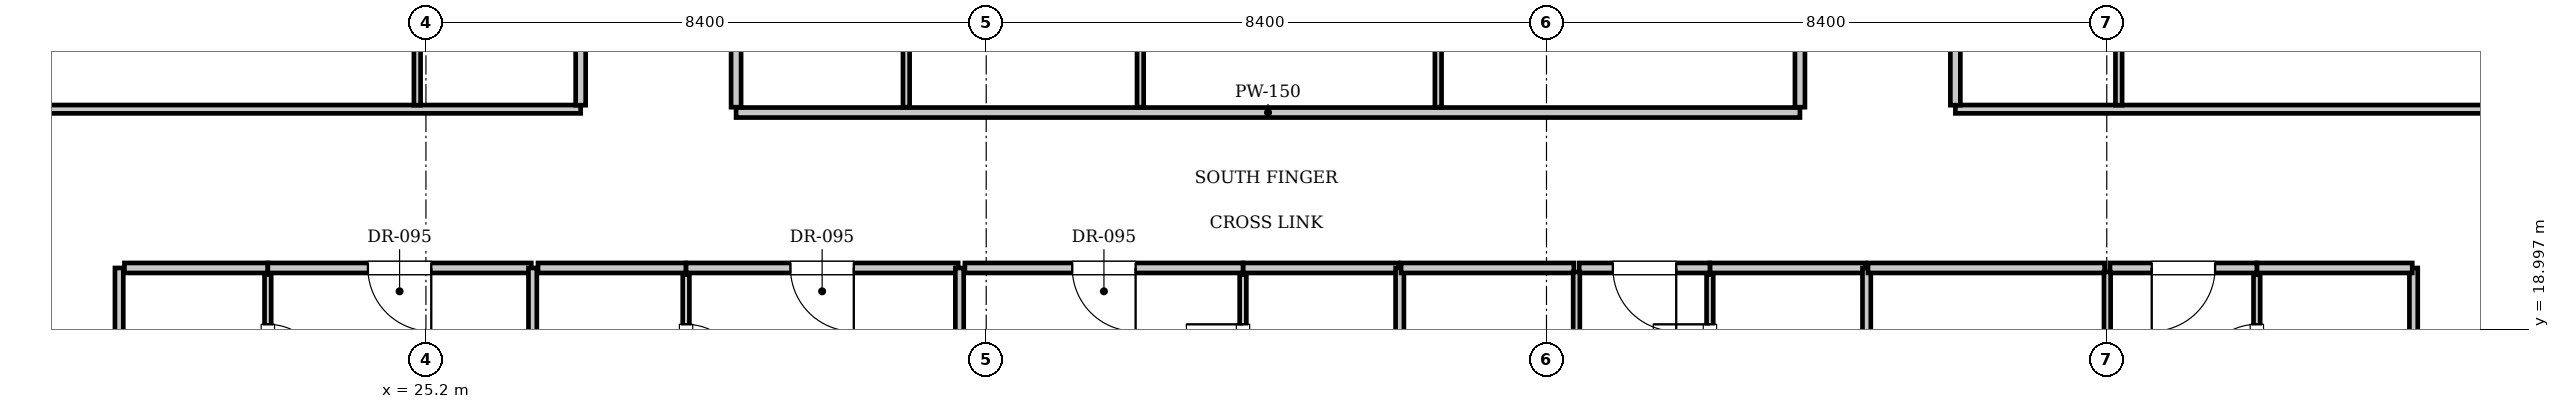
"""IFC4 building model, lengths in metres.
Left out: names, types, materials, properties, quantities, classifications, styles, units other than length and angle.
Written with IfcOpenShell. Run it as: python <this file> out.ifc"""

import sys

from ifc_helpers import new_model, si_unit, direction, frame, frame_2d, origin, place, context, subcontext, project, spatial, rectangle, extrude, element, fill, save


model = new_model("IFC4")
c1 = context("Model", 3, precision=1e-05, world=origin(), true_north=direction((0.0, 1.0)))
c2 = subcontext(c1, "Body", "Model", "MODEL_VIEW")
j1 = project(units=[si_unit("LENGTHUNIT", "METRE"), si_unit("PLANEANGLEUNIT", "RADIAN")], contexts=[c1])
p1 = place(None, origin())
s1 = spatial("IfcSite", under=j1, at=p1, CompositionType="ELEMENT")
p2 = place(p1, origin())
s2 = spatial("IfcBuilding", under=s1, at=p2, CompositionType="ELEMENT")
p3 = place(p2, frame((0.0, 0.0, 285.6)))
s3 = spatial("IfcBuildingStorey", under=s2, at=p3, CompositionType="ELEMENT", Elevation=285.6)
p4 = place(p3, frame((29.85, 22.25, 0.0), z_axis=(0.0, 0.0, 1.0), x_axis=(1.0, 0.0, 0.0)))
e1 = element("IfcWall", 1, at=p4, inside=s3, PredefinedType="PARTITIONING", context=c2, shape_type="SweptSolid", body=[
    extrude(rectangle(XDim=15.95, YDim=0.15, at=frame_2d((7.975, 0.0))), origin(), (0.0, 0.0, 1.0), 3.61),
])
for number, where, z_axis, x_axis in (
    (2, (29.85, 22.33, 0.0), (0.0, 0.0, 1.0), (0.0, 1.0, 0.0)),
    (3, (45.8, 22.33, 0.0), (0.0, 0.0, 1.0), (0.0, 1.0, 0.0)),
):
    element("IfcWall", number, at=place(p3, frame(where, z_axis=z_axis, x_axis=x_axis)), inside=s3, PredefinedType="PARTITIONING", context=c2, shape_type="SweptSolid", body=[
        extrude(rectangle(XDim=7.69, YDim=0.15, at=frame_2d((3.845, 0.0))), origin(), (0.0, 0.0, 1.0), 3.61),
    ])
for number, where, z_axis, x_axis in (
    (4, (32.402, 22.33, 0.0), (0.0, 0.0, 1.0), (0.0, 1.0, 0.0)),
    (5, (35.911, 22.33, 0.0), (0.0, 0.0, 1.0), (0.0, 1.0, 0.0)),
    (6, (40.377, 22.33, 0.0), (0.0, 0.0, 1.0), (0.0, 1.0, 0.0)),
):
    element("IfcWall", number, at=place(p3, frame(where, z_axis=z_axis, x_axis=x_axis)), inside=s3, PredefinedType="PARTITIONING", context=c2, shape_type="SweptSolid", body=[
        extrude(rectangle(XDim=7.69, YDim=0.1, at=frame_2d((3.845, 0.0))), origin(), (0.0, 0.0, 1.0), 3.61),
    ])
for number, where, z_axis, x_axis in (
    (7, (20.6, 14.4, 0.0), (0.0, 0.0, 1.0), (0.0, 1.0, 0.0)),
    (8, (55.0, 14.4, 0.0), (0.0, 0.0, 1.0), (0.0, 1.0, 0.0)),
):
    element("IfcWall", number, at=place(p3, frame(where, z_axis=z_axis, x_axis=x_axis)), inside=s3, PredefinedType="PARTITIONING", context=c2, shape_type="SweptSolid", body=[
        extrude(rectangle(XDim=5.52, YDim=0.125, at=frame_2d((2.76, 0.0))), origin(), (0.0, 0.0, 1.0), 3.61),
    ])
p5 = place(p3, frame((20.68, 19.92, 0.0), z_axis=(0.0, 0.0, 1.0), x_axis=(1.0, 0.0, 0.0)))
e9 = element("IfcWall", 9, at=p5, inside=s3, PredefinedType="PARTITIONING", context=c2, shape_type="SweptSolid", body=[
    extrude(rectangle(XDim=2.15, YDim=0.15, at=frame_2d((1.075, 0.0))), origin(), (0.0, 0.0, 1.0), 3.61),
])
p6 = place(p3, frame((22.83, 17.48, 0.0), z_axis=(0.0, 0.0, 1.0), x_axis=(0.0, 1.0, 0.0)))
e10 = element("IfcWall", 10, at=p6, inside=s3, PredefinedType="PARTITIONING", context=c2, shape_type="SweptSolid", body=[
    extrude(rectangle(XDim=2.34, YDim=0.1, at=frame_2d((1.17, 0.0))), origin(), (0.0, 0.0, 1.0), 3.61),
])
p7 = place(p6, frame((0.745, 0.0, 0.0)))
e11 = element("IfcOpeningElement", 11, at=p7, cuts=e10, PredefinedType="OPENING", context=c2, shape_type="SweptSolid", body=[
    extrude(rectangle(XDim=0.85, YDim=2.1, at=frame_2d((0.425, 1.05))), frame((0.0, 0.06, 0.0), z_axis=(0.0, -1.0, 0.0), x_axis=(1.0, 0.0, 0.0)), (0.0, 0.0, 1.0), 0.12),
])
p8 = place(p3, frame((22.83, 19.92, 0.0), z_axis=(0.0, 0.0, 1.0), x_axis=(1.0, 0.0, 0.0)))
e12 = element("IfcWall", 12, at=p8, inside=s3, PredefinedType="PARTITIONING", context=c2, shape_type="SweptSolid", body=[
    extrude(rectangle(XDim=3.95, YDim=0.15, at=frame_2d((1.975, 0.0))), origin(), (0.0, 0.0, 1.0), 3.61),
])
p9 = place(p8, frame((1.5, 0.0, 0.0)))
e13 = element("IfcOpeningElement", 13, at=p9, cuts=e12, PredefinedType="OPENING", context=c2, shape_type="SweptSolid", body=[
    extrude(rectangle(XDim=0.95, YDim=2.15, at=frame_2d((0.475, 1.075))), frame((0.0, 0.085, 0.0), z_axis=(0.0, -1.0, 0.0), x_axis=(1.0, 0.0, 0.0)), (0.0, 0.0, 1.0), 0.17),
])
p10 = place(p3, frame((26.8, 9.3, 0.0), z_axis=(0.0, 0.0, 1.0), x_axis=(0.0, 1.0, 0.0)))
e14 = element("IfcWall", 14, at=p10, inside=s3, PredefinedType="PARTITIONING", context=c2, shape_type="SweptSolid", body=[
    extrude(rectangle(XDim=10.62, YDim=0.125, at=frame_2d((5.31, 0.0))), origin(), (0.0, 0.0, 1.0), 3.61),
])
p11 = place(p3, frame((26.88, 19.92, 0.0), z_axis=(0.0, 0.0, 1.0), x_axis=(1.0, 0.0, 0.0)))
e15 = element("IfcWall", 15, at=p11, inside=s3, PredefinedType="PARTITIONING", context=c2, shape_type="SweptSolid", body=[
    extrude(rectangle(XDim=2.22, YDim=0.15, at=frame_2d((1.11, 0.0))), origin(), (0.0, 0.0, 1.0), 3.61),
])
p12 = place(p3, frame((29.1, 17.48, 0.0), z_axis=(0.0, 0.0, 1.0), x_axis=(0.0, 1.0, 0.0)))
e16 = element("IfcWall", 16, at=p12, inside=s3, PredefinedType="PARTITIONING", context=c2, shape_type="SweptSolid", body=[
    extrude(rectangle(XDim=2.34, YDim=0.1, at=frame_2d((1.17, 0.0))), origin(), (0.0, 0.0, 1.0), 3.61),
])
p13 = place(p12, frame((0.745, 0.0, 0.0)))
e17 = element("IfcOpeningElement", 17, at=p13, cuts=e16, PredefinedType="OPENING", context=c2, shape_type="SweptSolid", body=[
    extrude(rectangle(XDim=0.85, YDim=2.1, at=frame_2d((0.425, 1.05))), frame((0.0, 0.06, 0.0), z_axis=(0.0, -1.0, 0.0), x_axis=(1.0, 0.0, 0.0)), (0.0, 0.0, 1.0), 0.12),
])
p14 = place(p3, frame((29.1, 19.92, 0.0), z_axis=(0.0, 0.0, 1.0), x_axis=(1.0, 0.0, 0.0)))
e18 = element("IfcWall", 18, at=p14, inside=s3, PredefinedType="PARTITIONING", context=c2, shape_type="SweptSolid", body=[
    extrude(rectangle(XDim=4.08, YDim=0.15, at=frame_2d((2.04, 0.0))), origin(), (0.0, 0.0, 1.0), 3.61),
])
p15 = place(p14, frame((1.565, 0.0, 0.0)))
e19 = element("IfcOpeningElement", 19, at=p15, cuts=e18, PredefinedType="OPENING", context=c2, shape_type="SweptSolid", body=[
    extrude(rectangle(XDim=0.95, YDim=2.15, at=frame_2d((0.475, 1.075))), frame((0.0, 0.085, 0.0), z_axis=(0.0, -1.0, 0.0), x_axis=(1.0, 0.0, 0.0)), (0.0, 0.0, 1.0), 0.17),
])
p16 = place(p3, frame((33.2, 9.3, 0.0), z_axis=(0.0, 0.0, 1.0), x_axis=(0.0, 1.0, 0.0)))
e20 = element("IfcWall", 20, at=p16, inside=s3, PredefinedType="PARTITIONING", context=c2, shape_type="SweptSolid", body=[
    extrude(rectangle(XDim=10.62, YDim=0.125, at=frame_2d((5.31, 0.0))), origin(), (0.0, 0.0, 1.0), 3.61),
])
p17 = place(p3, frame((37.45, 19.92, 0.0), z_axis=(0.0, 0.0, 1.0), x_axis=(1.0, 0.0, 0.0)))
e21 = element("IfcWall", 21, at=p17, inside=s3, PredefinedType="PARTITIONING", context=c2, shape_type="SweptSolid", body=[
    extrude(rectangle(XDim=2.33, YDim=0.15, at=frame_2d((1.165, 0.0))), origin(), (0.0, 0.0, 1.0), 3.61),
])
p18 = place(p3, frame((37.45, 17.48, 0.0), z_axis=(0.0, 0.0, 1.0), x_axis=(0.0, 1.0, 0.0)))
e22 = element("IfcWall", 22, at=p18, inside=s3, PredefinedType="PARTITIONING", context=c2, shape_type="SweptSolid", body=[
    extrude(rectangle(XDim=2.34, YDim=0.1, at=frame_2d((1.17, 0.0))), origin(), (0.0, 0.0, 1.0), 3.61),
])
p19 = place(p18, frame((0.745, 0.0, 0.0)))
e23 = element("IfcOpeningElement", 23, at=p19, cuts=e22, PredefinedType="OPENING", context=c2, shape_type="SweptSolid", body=[
    extrude(rectangle(XDim=0.85, YDim=2.1, at=frame_2d((0.425, 1.05))), frame((0.0, 0.06, 0.0), z_axis=(0.0, -1.0, 0.0), x_axis=(1.0, 0.0, 0.0)), (0.0, 0.0, 1.0), 0.12),
])
p20 = place(p3, frame((33.28, 19.92, 0.0), z_axis=(0.0, 0.0, 1.0), x_axis=(1.0, 0.0, 0.0)))
e24 = element("IfcWall", 24, at=p20, inside=s3, PredefinedType="PARTITIONING", context=c2, shape_type="SweptSolid", body=[
    extrude(rectangle(XDim=4.17, YDim=0.15, at=frame_2d((2.085, 0.0))), origin(), (0.0, 0.0, 1.0), 3.61),
])
p21 = place(p20, frame((1.61, 0.0, 0.0)))
e25 = element("IfcOpeningElement", 25, at=p21, cuts=e24, PredefinedType="OPENING", context=c2, shape_type="SweptSolid", body=[
    extrude(rectangle(XDim=0.95, YDim=2.15, at=frame_2d((0.475, 1.075))), frame((0.0, 0.085, 0.0), z_axis=(0.0, -1.0, 0.0), x_axis=(1.0, 0.0, 0.0)), (0.0, 0.0, 1.0), 0.17),
])
p22 = place(p3, frame((39.8, 9.3, 0.0), z_axis=(0.0, 0.0, 1.0), x_axis=(0.0, 1.0, 0.0)))
e26 = element("IfcWall", 26, at=p22, inside=s3, PredefinedType="PARTITIONING", context=c2, shape_type="SweptSolid", body=[
    extrude(rectangle(XDim=10.62, YDim=0.125, at=frame_2d((5.31, 0.0))), origin(), (0.0, 0.0, 1.0), 3.61),
])
p23 = place(p3, frame((44.45, 19.92, 0.0), z_axis=(0.0, 0.0, 1.0), x_axis=(1.0, 0.0, 0.0)))
e27 = element("IfcWall", 27, at=p23, inside=s3, PredefinedType="PARTITIONING", context=c2, shape_type="SweptSolid", body=[
    extrude(rectangle(XDim=2.33, YDim=0.15, at=frame_2d((1.165, 0.0))), origin(), (0.0, 0.0, 1.0), 3.61),
])
p24 = place(p3, frame((44.45, 17.48, 0.0), z_axis=(0.0, 0.0, 1.0), x_axis=(0.0, 1.0, 0.0)))
e28 = element("IfcWall", 28, at=p24, inside=s3, PredefinedType="PARTITIONING", context=c2, shape_type="SweptSolid", body=[
    extrude(rectangle(XDim=2.34, YDim=0.1, at=frame_2d((1.17, 0.0))), origin(), (0.0, 0.0, 1.0), 3.61),
])
p25 = place(p24, frame((0.745, 0.0, 0.0)))
e29 = element("IfcOpeningElement", 29, at=p25, cuts=e28, PredefinedType="OPENING", context=c2, shape_type="SweptSolid", body=[
    extrude(rectangle(XDim=0.85, YDim=2.1, at=frame_2d((0.425, 1.05))), frame((0.0, 0.06, 0.0), z_axis=(0.0, -1.0, 0.0), x_axis=(1.0, 0.0, 0.0)), (0.0, 0.0, 1.0), 0.12),
])
p26 = place(p3, frame((39.82, 19.92, 0.0), z_axis=(0.0, 0.0, 1.0), x_axis=(1.0, 0.0, 0.0)))
e30 = element("IfcWall", 30, at=p26, inside=s3, PredefinedType="PARTITIONING", context=c2, shape_type="SweptSolid", body=[
    extrude(rectangle(XDim=2.59, YDim=0.15, at=frame_2d((1.295, 0.0))), origin(), (0.0, 0.0, 1.0), 3.61),
])
p27 = place(p3, frame((42.49, 19.92, 0.0), z_axis=(0.0, 0.0, 1.0), x_axis=(1.0, 0.0, 0.0)))
e31 = element("IfcWall", 31, at=p27, inside=s3, PredefinedType="PARTITIONING", context=c2, shape_type="SweptSolid", body=[
    extrude(rectangle(XDim=1.96, YDim=0.15, at=frame_2d((0.98, 0.0))), origin(), (0.0, 0.0, 1.0), 3.61),
])
p28 = place(p27, frame((0.505, 0.0, 0.0)))
e32 = element("IfcOpeningElement", 32, at=p28, cuts=e31, PredefinedType="OPENING", context=c2, shape_type="SweptSolid", body=[
    extrude(rectangle(XDim=0.95, YDim=2.15, at=frame_2d((0.475, 1.075))), frame((0.0, 0.085, 0.0), z_axis=(0.0, -1.0, 0.0), x_axis=(1.0, 0.0, 0.0)), (0.0, 0.0, 1.0), 0.17),
])
p29 = place(p3, frame((42.45, 9.23, 0.0), z_axis=(0.0, 0.0, 1.0), x_axis=(0.0, 1.0, 0.0)))
e33 = element("IfcWall", 33, at=p29, inside=s3, PredefinedType="PARTITIONING", context=c2, shape_type="SweptSolid", body=[
    extrude(rectangle(XDim=10.63, YDim=0.1, at=frame_2d((5.315, 0.0))), origin(), (0.0, 0.0, 1.0), 3.61),
])
p30 = place(p29, frame((1.6, 0.0, 0.0)))
e34 = element("IfcOpeningElement", 34, at=p30, cuts=e33, PredefinedType="OPENING", context=c2, shape_type="SweptSolid", body=[
    extrude(rectangle(XDim=0.9, YDim=2.1, at=frame_2d((0.45, 1.05))), frame((0.0, 0.06, 0.0), z_axis=(0.0, -1.0, 0.0), x_axis=(1.0, 0.0, 0.0)), (0.0, 0.0, 1.0), 0.12),
])
p31 = place(p3, frame((46.8, 9.3, 0.0), z_axis=(0.0, 0.0, 1.0), x_axis=(0.0, 1.0, 0.0)))
e35 = element("IfcWall", 35, at=p31, inside=s3, PredefinedType="PARTITIONING", context=c2, shape_type="SweptSolid", body=[
    extrude(rectangle(XDim=10.62, YDim=0.125, at=frame_2d((5.31, 0.0))), origin(), (0.0, 0.0, 1.0), 3.61),
])
p32 = place(p3, frame((52.65, 19.92, 0.0), z_axis=(0.0, 0.0, 1.0), x_axis=(1.0, 0.0, 0.0)))
e36 = element("IfcWall", 36, at=p32, inside=s3, PredefinedType="PARTITIONING", context=c2, shape_type="SweptSolid", body=[
    extrude(rectangle(XDim=2.33, YDim=0.15, at=frame_2d((1.165, 0.0))), origin(), (0.0, 0.0, 1.0), 3.61),
])
p33 = place(p3, frame((52.65, 17.48, 0.0), z_axis=(0.0, 0.0, 1.0), x_axis=(0.0, 1.0, 0.0)))
e37 = element("IfcWall", 37, at=p33, inside=s3, PredefinedType="PARTITIONING", context=c2, shape_type="SweptSolid", body=[
    extrude(rectangle(XDim=2.34, YDim=0.1, at=frame_2d((1.17, 0.0))), origin(), (0.0, 0.0, 1.0), 3.61),
])
p34 = place(p33, frame((0.745, 0.0, 0.0)))
e38 = element("IfcOpeningElement", 38, at=p34, cuts=e37, PredefinedType="OPENING", context=c2, shape_type="SweptSolid", body=[
    extrude(rectangle(XDim=0.85, YDim=2.1, at=frame_2d((0.425, 1.05))), frame((0.0, 0.06, 0.0), z_axis=(0.0, -1.0, 0.0), x_axis=(1.0, 0.0, 0.0)), (0.0, 0.0, 1.0), 0.12),
])
p35 = place(p3, frame((46.82, 19.92, 0.0), z_axis=(0.0, 0.0, 1.0), x_axis=(1.0, 0.0, 0.0)))
e39 = element("IfcWall", 39, at=p35, inside=s3, PredefinedType="PARTITIONING", context=c2, shape_type="SweptSolid", body=[
    extrude(rectangle(XDim=3.548, YDim=0.15, at=frame_2d((1.774, 0.0))), origin(), (0.0, 0.0, 1.0), 3.61),
])
p36 = place(p3, frame((50.448, 19.92, 0.0), z_axis=(0.0, 0.0, 1.0), x_axis=(1.0, 0.0, 0.0)))
e40 = element("IfcWall", 40, at=p36, inside=s3, PredefinedType="PARTITIONING", context=c2, shape_type="SweptSolid", body=[
    extrude(rectangle(XDim=2.202, YDim=0.15, at=frame_2d((1.101, 0.0))), origin(), (0.0, 0.0, 1.0), 3.61),
])
p37 = place(p36, frame((0.626, 0.0, 0.0)))
e41 = element("IfcOpeningElement", 41, at=p37, cuts=e40, PredefinedType="OPENING", context=c2, shape_type="SweptSolid", body=[
    extrude(rectangle(XDim=0.95, YDim=2.15, at=frame_2d((0.475, 1.075))), frame((0.0, 0.085, 0.0), z_axis=(0.0, -1.0, 0.0), x_axis=(1.0, 0.0, 0.0)), (0.0, 0.0, 1.0), 0.17),
])
p38 = place(p3, frame((50.408, 9.23, 0.0), z_axis=(0.0, 0.0, 1.0), x_axis=(0.0, 1.0, 0.0)))
e42 = element("IfcWall", 42, at=p38, inside=s3, PredefinedType="PARTITIONING", context=c2, shape_type="SweptSolid", body=[
    extrude(rectangle(XDim=10.63, YDim=0.1, at=frame_2d((5.315, 0.0))), origin(), (0.0, 0.0, 1.0), 3.081),
])
p39 = place(p38, frame((1.6, 0.0, 0.0)))
e43 = element("IfcOpeningElement", 43, at=p39, cuts=e42, PredefinedType="OPENING", context=c2, shape_type="SweptSolid", body=[
    extrude(rectangle(XDim=0.9, YDim=2.1, at=frame_2d((0.45, 1.05))), frame((0.0, 0.06, 0.0), z_axis=(0.0, -1.0, 0.0), x_axis=(1.0, 0.0, 0.0)), (0.0, 0.0, 1.0), 0.12),
])
p40 = place(p3, frame((15.5, 22.3, 0.0), z_axis=(0.0, 0.0, 1.0), x_axis=(1.0, 0.0, 0.0)))
e44 = element("IfcWall", 44, at=p40, inside=s3, PredefinedType="PARTITIONING", context=c2, shape_type="SweptSolid", body=[
    extrude(rectangle(XDim=12.02, YDim=0.125, at=frame_2d((6.01, 0.0))), origin(), (0.0, 0.0, 1.0), 3.61),
])
p41 = place(p3, frame((48.13, 22.3, 0.0), z_axis=(0.0, 0.0, 1.0), x_axis=(1.0, 0.0, 0.0)))
e45 = element("IfcWall", 45, at=p41, inside=s3, PredefinedType="PARTITIONING", context=c2, shape_type="SweptSolid", body=[
    extrude(rectangle(XDim=11.97, YDim=0.125, at=frame_2d((5.985, 0.0))), origin(), (0.0, 0.0, 1.0), 3.61),
])
p42 = place(p3, frame((27.52, 22.36, 0.0), z_axis=(0.0, 0.0, 1.0), x_axis=(0.0, 1.0, 0.0)))
e46 = element("IfcWall", 46, at=p42, inside=s3, PredefinedType="PARTITIONING", context=c2, shape_type="SweptSolid", body=[
    extrude(rectangle(XDim=1.89, YDim=0.15, at=frame_2d((0.945, 0.0))), origin(), (0.0, 0.0, 1.0), 3.61),
])
p43 = place(p3, frame((25.07, 22.36, 0.0), z_axis=(0.0, 0.0, 1.0), x_axis=(0.0, 1.0, 0.0)))
e47 = element("IfcWall", 47, at=p43, inside=s3, PredefinedType="PARTITIONING", context=c2, shape_type="SweptSolid", body=[
    extrude(rectangle(XDim=1.89, YDim=0.1, at=frame_2d((0.945, 0.0))), origin(), (0.0, 0.0, 1.0), 3.61),
])
p44 = place(p3, frame((48.13, 22.36, 0.0), z_axis=(0.0, 0.0, 1.0), x_axis=(0.0, 1.0, 0.0)))
e48 = element("IfcWall", 48, at=p44, inside=s3, PredefinedType="PARTITIONING", context=c2, shape_type="SweptSolid", body=[
    extrude(rectangle(XDim=1.89, YDim=0.15, at=frame_2d((0.945, 0.0))), origin(), (0.0, 0.0, 1.0), 3.61),
])
p45 = place(p3, frame((50.58, 22.36, 0.0), z_axis=(0.0, 0.0, 1.0), x_axis=(0.0, 1.0, 0.0)))
e49 = element("IfcWall", 49, at=p45, inside=s3, PredefinedType="PARTITIONING", context=c2, shape_type="SweptSolid", body=[
    extrude(rectangle(XDim=1.89, YDim=0.1, at=frame_2d((0.945, 0.0))), origin(), (0.0, 0.0, 1.0), 3.61),
])
p46 = place(p7, frame((0.85, 0.0, 0.0), z_axis=(0.0, 0.0, 1.0), x_axis=(-1.0, 0.0, 0.0)))
e50 = element("IfcDoor", 50, at=p46, inside=s3, OperationType="SINGLE_SWING_RIGHT", PredefinedType="DOOR", context=c2, shape_type="SweptSolid", body=[
    extrude(rectangle(XDim=0.85, YDim=2.1, at=frame_2d((0.425, 1.05))), frame((0.0, 0.025, 0.0), z_axis=(0.0, -1.0, 0.0), x_axis=(1.0, 0.0, 0.0)), (0.0, 0.0, 1.0), 0.05),
])
fill(e11, e50)
p47 = place(p9, frame((0.95, 0.0, 0.0), z_axis=(0.0, 0.0, 1.0), x_axis=(-1.0, 0.0, 0.0)))
e51 = element("IfcDoor", 51, at=p47, inside=s3, OperationType="SINGLE_SWING_LEFT", PredefinedType="DOOR", context=c2, shape_type="SweptSolid", body=[
    extrude(rectangle(XDim=0.95, YDim=2.15, at=frame_2d((0.475, 1.075))), frame((0.0, 0.025, 0.0), z_axis=(0.0, -1.0, 0.0), x_axis=(1.0, 0.0, 0.0)), (0.0, 0.0, 1.0), 0.05),
])
fill(e13, e51)
p48 = place(p13, frame((0.85, 0.0, 0.0), z_axis=(0.0, 0.0, 1.0), x_axis=(-1.0, 0.0, 0.0)))
e52 = element("IfcDoor", 52, at=p48, inside=s3, OperationType="SINGLE_SWING_RIGHT", PredefinedType="DOOR", context=c2, shape_type="SweptSolid", body=[
    extrude(rectangle(XDim=0.85, YDim=2.1, at=frame_2d((0.425, 1.05))), frame((0.0, 0.025, 0.0), z_axis=(0.0, -1.0, 0.0), x_axis=(1.0, 0.0, 0.0)), (0.0, 0.0, 1.0), 0.05),
])
fill(e17, e52)
p49 = place(p15, frame((0.95, 0.0, 0.0), z_axis=(0.0, 0.0, 1.0), x_axis=(-1.0, 0.0, 0.0)))
e53 = element("IfcDoor", 53, at=p49, inside=s3, OperationType="SINGLE_SWING_LEFT", PredefinedType="DOOR", context=c2, shape_type="SweptSolid", body=[
    extrude(rectangle(XDim=0.95, YDim=2.15, at=frame_2d((0.475, 1.075))), frame((0.0, 0.025, 0.0), z_axis=(0.0, -1.0, 0.0), x_axis=(1.0, 0.0, 0.0)), (0.0, 0.0, 1.0), 0.05),
])
fill(e19, e53)
p50 = place(p19, origin())
e54 = element("IfcDoor", 54, at=p50, inside=s3, OperationType="SINGLE_SWING_RIGHT", PredefinedType="DOOR", context=c2, shape_type="SweptSolid", body=[
    extrude(rectangle(XDim=0.85, YDim=2.1, at=frame_2d((0.425, 1.05))), frame((0.0, 0.025, 0.0), z_axis=(0.0, -1.0, 0.0), x_axis=(1.0, 0.0, 0.0)), (0.0, 0.0, 1.0), 0.05),
])
fill(e23, e54)
p51 = place(p21, frame((0.95, 0.0, 0.0), z_axis=(0.0, 0.0, 1.0), x_axis=(-1.0, 0.0, 0.0)))
e55 = element("IfcDoor", 55, at=p51, inside=s3, OperationType="SINGLE_SWING_LEFT", PredefinedType="DOOR", context=c2, shape_type="SweptSolid", body=[
    extrude(rectangle(XDim=0.95, YDim=2.15, at=frame_2d((0.475, 1.075))), frame((0.0, 0.025, 0.0), z_axis=(0.0, -1.0, 0.0), x_axis=(1.0, 0.0, 0.0)), (0.0, 0.0, 1.0), 0.05),
])
fill(e25, e55)
p52 = place(p25, origin())
e56 = element("IfcDoor", 56, at=p52, inside=s3, OperationType="SINGLE_SWING_RIGHT", PredefinedType="DOOR", context=c2, shape_type="SweptSolid", body=[
    extrude(rectangle(XDim=0.85, YDim=2.1, at=frame_2d((0.425, 1.05))), frame((0.0, 0.025, 0.0), z_axis=(0.0, -1.0, 0.0), x_axis=(1.0, 0.0, 0.0)), (0.0, 0.0, 1.0), 0.05),
])
fill(e29, e56)
p53 = place(p28, frame((0.95, 0.0, 0.0), z_axis=(0.0, 0.0, 1.0), x_axis=(-1.0, 0.0, 0.0)))
e57 = element("IfcDoor", 57, at=p53, inside=s3, OperationType="SINGLE_SWING_LEFT", PredefinedType="DOOR", context=c2, shape_type="SweptSolid", body=[
    extrude(rectangle(XDim=0.95, YDim=2.15, at=frame_2d((0.475, 1.075))), frame((0.0, 0.025, 0.0), z_axis=(0.0, -1.0, 0.0), x_axis=(1.0, 0.0, 0.0)), (0.0, 0.0, 1.0), 0.05),
])
fill(e32, e57)
p54 = place(p34, origin())
e58 = element("IfcDoor", 58, at=p54, inside=s3, OperationType="SINGLE_SWING_LEFT", PredefinedType="DOOR", context=c2, shape_type="SweptSolid", body=[
    extrude(rectangle(XDim=0.85, YDim=2.1, at=frame_2d((0.425, 1.05))), frame((0.0, 0.025, 0.0), z_axis=(0.0, -1.0, 0.0), x_axis=(1.0, 0.0, 0.0)), (0.0, 0.0, 1.0), 0.05),
])
fill(e38, e58)
p55 = place(p37, frame((0.95, 0.0, 0.0), z_axis=(0.0, 0.0, 1.0), x_axis=(-1.0, 0.0, 0.0)))
e59 = element("IfcDoor", 59, at=p55, inside=s3, OperationType="SINGLE_SWING_RIGHT", PredefinedType="DOOR", context=c2, shape_type="SweptSolid", body=[
    extrude(rectangle(XDim=0.95, YDim=2.15, at=frame_2d((0.475, 1.075))), frame((0.0, 0.025, 0.0), z_axis=(0.0, -1.0, 0.0), x_axis=(1.0, 0.0, 0.0)), (0.0, 0.0, 1.0), 0.05),
])
fill(e41, e59)
save(model, sys.argv[1])
